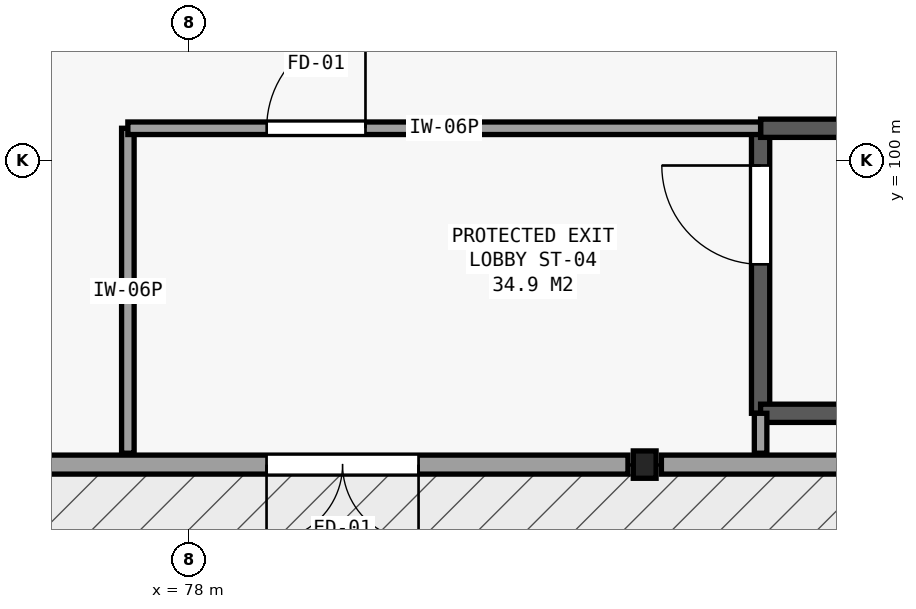
"""IFC4 building model, lengths in metres.
Left out: names, types, materials, properties, quantities, classifications, styles, units other than length and angle.
Written with IfcOpenShell. Run it as: python <this file> out.ifc"""

import sys

from ifc_helpers import new_model, si_unit, direction, frame, frame_2d, origin, origin_2d, place, context, subcontext, project, spatial, rectangle, i_section, extrude, element, fill, save


model = new_model("IFC4")
c1 = context("Model", 3, precision=1e-05, world=origin(), true_north=direction((0.0, 1.0)))
c2 = subcontext(c1, "Body", "Model", "MODEL_VIEW")
j1 = project(units=[si_unit("LENGTHUNIT", "METRE"), si_unit("PLANEANGLEUNIT", "RADIAN")], contexts=[c1])
p1 = place(None, origin())
s1 = spatial("IfcSite", under=j1, at=p1, CompositionType="ELEMENT")
p2 = place(p1, origin())
s2 = spatial("IfcBuilding", under=s1, at=p2, CompositionType="ELEMENT")
p3 = place(p2, origin())
s3 = spatial("IfcBuildingStorey", under=s2, at=p3, CompositionType="ELEMENT", Elevation=0.0)
p4 = place(p3, frame((84.0, 96.0, 0.0), z_axis=(0.0, 0.0, 1.0), x_axis=(1.0, 0.0, 0.0)))
e1 = element("IfcColumn", 1, at=p4, inside=s3, PredefinedType="COLUMN", context=c2, shape_type="SweptSolid", body=[
    extrude(i_section(OverallWidth=0.3, OverallDepth=0.36, WebThickness=0.012, FlangeThickness=0.022, FilletRadius=0.027, at=origin_2d()), origin(), (0.0, 0.0, 1.0), 5.4),
])
p5 = place(p3, frame((83.78, 96.0, 0.0), z_axis=(0.0, 0.0, 1.0), x_axis=(-1.0, 0.0, 0.0)))
e2 = element("IfcWall", 2, at=p5, inside=s3, PredefinedType="SOLIDWALL", context=c2, shape_type="SweptSolid", body=[
    extrude(rectangle(XDim=8.56, YDim=0.25, at=frame_2d((4.28, 0.0))), origin(), (0.0, 0.0, 1.0), 4.61),
])
p6 = place(p5, frame((2.755, 0.0, 0.0)))
e3 = element("IfcOpeningElement", 3, at=p6, cuts=e2, PredefinedType="OPENING", context=c2, shape_type="SweptSolid", body=[
    extrude(rectangle(XDim=2.0, YDim=2.3, at=frame_2d((1.0, 1.15))), frame((0.0, 0.135, 0.0), z_axis=(0.0, -1.0, 0.0), x_axis=(1.0, 0.0, 0.0)), (0.0, 0.0, 1.0), 0.27),
])
p7 = place(p3, frame((92.78, 96.0, 0.0), z_axis=(0.0, 0.0, 1.0), x_axis=(-1.0, 0.0, 0.0)))
e4 = element("IfcWall", 4, at=p7, inside=s3, PredefinedType="SOLIDWALL", context=c2, shape_type="SweptSolid", body=[
    extrude(rectangle(XDim=8.56, YDim=0.25, at=frame_2d((4.28, 0.0))), origin(), (0.0, 0.0, 1.0), 4.61),
])
p8 = place(p7, frame((3.08, 0.0, 2.1)))
e5 = element("IfcOpeningElement", 5, at=p8, cuts=e4, PredefinedType="OPENING", context=c2, shape_type="SweptSolid", body=[
    extrude(rectangle(XDim=2.4, YDim=1.1, at=frame_2d((1.2, 0.55))), frame((0.0, 0.135, 0.0), z_axis=(0.0, -1.0, 0.0), x_axis=(1.0, 0.0, 0.0)), (0.0, 0.0, 1.0), 0.27),
])
p9 = place(p3, frame((85.525, 96.675, 0.0), z_axis=(0.0, 0.0, 1.0), x_axis=(0.0, 1.0, 0.0)))
e6 = element("IfcWall", 6, at=p9, inside=s3, PredefinedType="SOLIDWALL", context=c2, shape_type="SweptSolid", body=[
    extrude(rectangle(XDim=3.75, YDim=0.24, at=frame_2d((1.875, 0.0))), origin(), (0.0, 0.0, 1.0), 5.11),
])
p10 = place(p9, frame((1.96, 0.0, 0.0)))
e7 = element("IfcOpeningElement", 7, at=p10, cuts=e6, PredefinedType="OPENING", context=c2, shape_type="SweptSolid", body=[
    extrude(rectangle(XDim=1.3, YDim=2.15, at=frame_2d((0.65, 1.075))), frame((0.0, 0.13, 0.0), z_axis=(0.0, -1.0, 0.0), x_axis=(1.0, 0.0, 0.0)), (0.0, 0.0, 1.0), 0.26),
])
for number, where, z_axis, x_axis in (
    (8, (93.525, 96.675, 0.0), (0.0, 0.0, 1.0), (-1.0, 0.0, 0.0)),
    (9, (85.525, 100.425, 0.0), (0.0, 0.0, 1.0), (1.0, 0.0, 0.0)),
):
    element("IfcWall", number, at=place(p3, frame(where, z_axis=z_axis, x_axis=x_axis)), inside=s3, PredefinedType="SOLIDWALL", context=c2, shape_type="SweptSolid", body=[
        extrude(rectangle(XDim=8.0, YDim=0.24, at=frame_2d((4.0, 0.0))), origin(), (0.0, 0.0, 1.0), 5.11),
    ])
p11 = place(p3, frame((77.2, 96.15, 0.0), z_axis=(0.0, 0.0, 1.0), x_axis=(0.0, 1.0, 0.0)))
e10 = element("IfcWall", 10, at=p11, inside=s3, PredefinedType="PARTITIONING", context=c2, shape_type="SweptSolid", body=[
    extrude(rectangle(XDim=4.275, YDim=0.165, at=frame_2d((2.138, 0.0))), origin(), (0.0, 0.0, 1.0), 5.02),
])
p12 = place(p3, frame((77.2, 100.425, 0.0), z_axis=(0.0, 0.0, 1.0), x_axis=(1.0, 0.0, 0.0)))
e11 = element("IfcWall", 11, at=p12, inside=s3, PredefinedType="PARTITIONING", context=c2, shape_type="SweptSolid", body=[
    extrude(rectangle(XDim=8.325, YDim=0.165, at=frame_2d((4.163, 0.0))), origin(), (0.0, 0.0, 1.0), 4.71),
])
p13 = place(p12, frame((1.826, 0.0, 0.0)))
e12 = element("IfcOpeningElement", 12, at=p13, cuts=e11, PredefinedType="OPENING", context=c2, shape_type="SweptSolid", body=[
    extrude(rectangle(XDim=1.3, YDim=2.15, at=frame_2d((0.65, 1.075))), frame((0.0, 0.093, 0.0), z_axis=(0.0, -1.0, 0.0), x_axis=(1.0, 0.0, 0.0)), (0.0, 0.0, 1.0), 0.185),
])
p14 = place(p3, frame((85.525, 96.15, 0.0), z_axis=(0.0, 0.0, 1.0), x_axis=(0.0, 1.0, 0.0)))
e13 = element("IfcWall", 13, at=p14, inside=s3, PredefinedType="PARTITIONING", context=c2, shape_type="SweptSolid", body=[
    extrude(rectangle(XDim=0.525, YDim=0.165, at=frame_2d((0.263, 0.0))), origin(), (0.0, 0.0, 1.0), 5.02),
])
p15 = place(p6, origin())
e14 = element("IfcDoor", 14, at=p15, inside=s3, OperationType="DOUBLE_DOOR_SINGLE_SWING", PredefinedType="DOOR", context=c2, shape_type="SweptSolid", body=[
    extrude(rectangle(XDim=2.0, YDim=2.3, at=frame_2d((1.0, 1.15))), frame((0.0, 0.025, 0.0), z_axis=(0.0, -1.0, 0.0), x_axis=(1.0, 0.0, 0.0)), (0.0, 0.0, 1.0), 0.05),
])
fill(e3, e14)
p16 = place(p10, origin())
e15 = element("IfcDoor", 15, at=p16, inside=s3, OperationType="SINGLE_SWING_RIGHT", PredefinedType="DOOR", context=c2, shape_type="SweptSolid", body=[
    extrude(rectangle(XDim=1.3, YDim=2.15, at=frame_2d((0.65, 1.075))), frame((0.0, 0.025, 0.0), z_axis=(0.0, -1.0, 0.0), x_axis=(1.0, 0.0, 0.0)), (0.0, 0.0, 1.0), 0.05),
])
fill(e7, e15)
p17 = place(p13, origin())
e16 = element("IfcDoor", 16, at=p17, inside=s3, OperationType="SINGLE_SWING_RIGHT", PredefinedType="DOOR", context=c2, shape_type="SweptSolid", body=[
    extrude(rectangle(XDim=1.3, YDim=2.15, at=frame_2d((0.65, 1.075))), frame((0.0, 0.025, 0.0), z_axis=(0.0, -1.0, 0.0), x_axis=(1.0, 0.0, 0.0)), (0.0, 0.0, 1.0), 0.05),
])
fill(e12, e16)
save(model, sys.argv[1])
